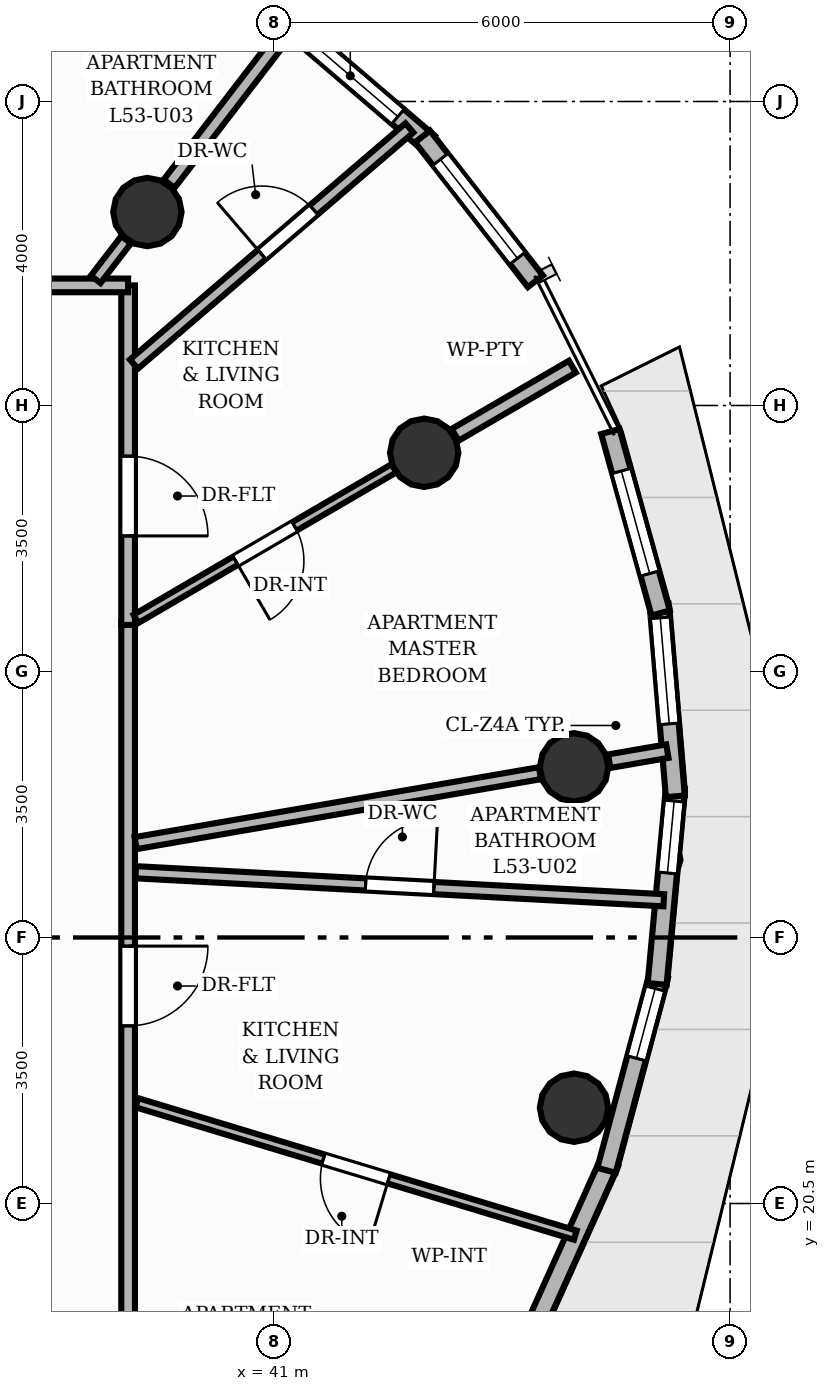
"""IFC4 building model, lengths in metres.
Left out: names, types, materials, properties, quantities, classifications, styles, units other than length and angle.
Written with IfcOpenShell. Run it as: python <this file> out.ifc"""

import sys

from ifc_helpers import new_model, si_unit, direction, frame, frame_2d, origin, origin_2d, place, context, subcontext, project, spatial, rectangle, circle, extrude, element, fill, save


model = new_model("IFC4")
c1 = context("Model", 3, precision=1e-05, world=origin(), true_north=direction((0.0, 1.0)))
c2 = subcontext(c1, "Body", "Model", "MODEL_VIEW")
j1 = project(units=[si_unit("LENGTHUNIT", "METRE"), si_unit("PLANEANGLEUNIT", "RADIAN")], contexts=[c1])
p1 = place(None, origin())
s1 = spatial("IfcSite", under=j1, at=p1, CompositionType="ELEMENT")
p2 = place(p1, origin())
s2 = spatial("IfcBuilding", under=s1, at=p2, CompositionType="ELEMENT")
p3 = place(p2, frame((0.0, 0.0, 179.04)))
s3 = spatial("IfcBuildingStorey", under=s2, at=p3, CompositionType="ELEMENT", Elevation=179.04)
for number, where, z_axis, x_axis in (
    (1, (44.946, 26.24, 0.0), (0.0, 0.0, 1.0), (1.0, 0.0, 0.0)),
    (2, (42.975, 30.378, 0.0), (0.0, 0.0, 1.0), (1.0, 0.0, 0.0)),
    (3, (39.333, 33.545, 0.0), (0.0, 0.0, 1.0), (1.0, 0.0, 0.0)),
    (4, (44.946, 21.76, 0.0), (0.0, 0.0, 1.0), (1.0, 0.0, 0.0)),
):
    element("IfcColumn", number, at=place(p3, frame(where, z_axis=z_axis, x_axis=x_axis)), inside=s3, PredefinedType="COLUMN", context=c2, shape_type="SweptSolid", body=[
        extrude(circle(Radius=0.45, at=origin_2d()), origin(), (0.0, 0.0, 1.0), 3.2),
    ])
p4 = place(p3, frame((41.198, 36.027, 0.0), z_axis=(0.0, 0.0, 1.0), x_axis=(0.759591927835, -0.65039995631, 0.0)))
e5 = element("IfcWall", 5, at=p4, inside=s3, PredefinedType="SOLIDWALL", context=c2, shape_type="SweptSolid", body=[
    extrude(rectangle(XDim=2.415, YDim=0.25, at=frame_2d((1.208, 0.0))), origin(), (0.0, 0.0, 1.0), 2.96),
])
p5 = place(p4, frame((0.234, 0.0, 0.85)))
e6 = element("IfcOpeningElement", 6, at=p5, cuts=e5, PredefinedType="OPENING", context=c2, shape_type="SweptSolid", body=[
    extrude(rectangle(XDim=1.65, YDim=1.52, at=frame_2d((0.825, 0.76))), frame((0.0, 0.135, 0.0), z_axis=(0.0, -1.0, 0.0), x_axis=(1.0, 0.0, 0.0)), (0.0, 0.0, 1.0), 0.27),
])
p6 = place(p3, frame((45.411, 21.04, 0.0), z_axis=(0.0, 0.0, 1.0), x_axis=(-0.410736648959, -0.911754026699, 0.0)))
e7 = element("IfcWall", 7, at=p6, inside=s3, PredefinedType="SOLIDWALL", context=c2, shape_type="SweptSolid", body=[
    extrude(rectangle(XDim=2.701, YDim=0.25, at=frame_2d((1.351, 0.0))), origin(), (0.0, 0.0, 1.0), 2.96),
])
p7 = place(p3, frame((46.06, 23.497, 0.0), z_axis=(0.0, 0.0, 1.0), x_axis=(-0.258688517816, -0.965960791518, 0.0)))
e8 = element("IfcWall", 8, at=p7, inside=s3, PredefinedType="SOLIDWALL", context=c2, shape_type="SweptSolid", body=[
    extrude(rectangle(XDim=2.651, YDim=0.25, at=frame_2d((1.326, 0.0))), origin(), (0.0, 0.0, 1.0), 2.96),
])
p8 = place(p7, frame((0.175, 0.0, 0.85)))
e9 = element("IfcOpeningElement", 9, at=p8, cuts=e8, PredefinedType="OPENING", context=c2, shape_type="SweptSolid", body=[
    extrude(rectangle(XDim=0.95, YDim=1.45, at=frame_2d((0.475, 0.725))), frame((0.0, 0.135, 0.0), z_axis=(0.0, -1.0, 0.0), x_axis=(1.0, 0.0, 0.0)), (0.0, 0.0, 1.0), 0.27),
])
p9 = place(p3, frame((46.28, 25.969, 0.0), z_axis=(0.0, 0.0, 1.0), x_axis=(-0.092582110032, -0.995705053167, 0.0)))
e10 = element("IfcWall", 10, at=p9, inside=s3, PredefinedType="SOLIDWALL", context=c2, shape_type="SweptSolid", body=[
    extrude(rectangle(XDim=2.592, YDim=0.25, at=frame_2d((1.296, 0.0))), origin(), (0.0, 0.0, 1.0), 2.96),
])
p10 = place(p9, frame((0.175, 0.0, 0.85)))
e11 = element("IfcOpeningElement", 11, at=p10, cuts=e10, PredefinedType="OPENING", context=c2, shape_type="SweptSolid", body=[
    extrude(rectangle(XDim=0.95, YDim=1.45, at=frame_2d((0.475, 0.725))), frame((0.0, 0.135, 0.0), z_axis=(0.0, -1.0, 0.0), x_axis=(1.0, 0.0, 0.0)), (0.0, 0.0, 1.0), 0.27),
])
p11 = place(p3, frame((46.066, 28.381, 0.0), z_axis=(0.0, 0.0, 1.0), x_axis=(0.084274320236, -0.996442591898, 0.0)))
e12 = element("IfcWall", 12, at=p11, inside=s3, PredefinedType="SOLIDWALL", context=c2, shape_type="SweptSolid", body=[
    extrude(rectangle(XDim=2.532, YDim=0.25, at=frame_2d((1.266, 0.0))), origin(), (0.0, 0.0, 1.0), 2.96),
])
p12 = place(p11, frame((0.175, 0.0, 0.85)))
e13 = element("IfcOpeningElement", 13, at=p12, cuts=e12, PredefinedType="OPENING", context=c2, shape_type="SweptSolid", body=[
    extrude(rectangle(XDim=1.4, YDim=1.55, at=frame_2d((0.7, 0.775))), frame((0.0, 0.135, 0.0), z_axis=(0.0, -1.0, 0.0), x_axis=(1.0, 0.0, 0.0)), (0.0, 0.0, 1.0), 0.27),
])
p13 = place(p3, frame((45.425, 30.658, 0.0), z_axis=(0.0, 0.0, 1.0), x_axis=(0.266734060973, -0.96377017007, 0.0)))
e14 = element("IfcWall", 14, at=p13, inside=s3, PredefinedType="SOLIDWALL", context=c2, shape_type="SweptSolid", body=[
    extrude(rectangle(XDim=2.478, YDim=0.25, at=frame_2d((1.239, 0.0))), origin(), (0.0, 0.0, 1.0), 2.96),
])
p14 = place(p13, frame((0.539, 0.0, 0.85)))
e15 = element("IfcOpeningElement", 15, at=p14, cuts=e14, PredefinedType="OPENING", context=c2, shape_type="SweptSolid", body=[
    extrude(rectangle(XDim=1.4, YDim=1.55, at=frame_2d((0.7, 0.775))), frame((0.0, 0.135, 0.0), z_axis=(0.0, -1.0, 0.0), x_axis=(1.0, 0.0, 0.0)), (0.0, 0.0, 1.0), 0.27),
])
p15 = place(p3, frame((42.953, 34.539, 0.0), z_axis=(0.0, 0.0, 1.0), x_axis=(0.61468225386, -0.788774826417, 0.0)))
e16 = element("IfcWall", 16, at=p15, inside=s3, PredefinedType="SOLIDWALL", context=c2, shape_type="SweptSolid", body=[
    extrude(rectangle(XDim=2.415, YDim=0.25, at=frame_2d((1.208, 0.0))), origin(), (0.0, 0.0, 1.0), 2.96),
])
p16 = place(p15, frame((0.382, 0.0, 0.85)))
e17 = element("IfcOpeningElement", 17, at=p16, cuts=e16, PredefinedType="OPENING", context=c2, shape_type="SweptSolid", body=[
    extrude(rectangle(XDim=1.65, YDim=1.55, at=frame_2d((0.825, 0.775))), frame((0.0, 0.135, 0.0), z_axis=(0.0, -1.0, 0.0), x_axis=(1.0, 0.0, 0.0)), (0.0, 0.0, 1.0), 0.27),
])
p17 = place(p3, frame((45.409, 26.32, 0.0), z_axis=(0.0, 0.0, 1.0), x_axis=(0.985363715758, 0.170465092225, 0.0)))
e18 = element("IfcWall", 18, at=p17, inside=s3, PredefinedType="PARTITIONING", context=c2, shape_type="SweptSolid", body=[
    extrude(rectangle(XDim=0.776, YDim=0.18, at=frame_2d((0.388, 0.0))), origin(), (0.0, 0.0, 1.0), 2.403),
])
p18 = place(p3, frame((43.382, 30.614, 0.0), z_axis=(0.0, 0.0, 1.0), x_axis=(0.86456661279, 0.502518230563, 0.0)))
e19 = element("IfcWall", 19, at=p18, inside=s3, PredefinedType="PARTITIONING", context=c2, shape_type="SweptSolid", body=[
    extrude(rectangle(XDim=1.785, YDim=0.18, at=frame_2d((0.893, 0.0))), origin(), (0.0, 0.0, 1.0), 2.403),
])
p19 = place(p3, frame((39.62, 33.918, 0.0), z_axis=(0.0, 0.0, 1.0), x_axis=(0.609164681512, 0.793043750873, 0.0)))
e20 = element("IfcWall", 20, at=p19, inside=s3, PredefinedType="PARTITIONING", context=c2, shape_type="SweptSolid", body=[
    extrude(rectangle(XDim=2.572, YDim=0.18, at=frame_2d((1.286, 0.0))), origin(), (0.0, 0.0, 1.0), 2.403),
])
p20 = place(p3, frame((39.08, 28.156, 0.0), z_axis=(0.0, 0.0, 1.0), x_axis=(0.0, -1.0, 0.0)))
e21 = element("IfcWall", 21, at=p20, inside=s3, PredefinedType="PARTITIONING", context=c2, shape_type="SweptSolid", body=[
    extrude(rectangle(XDim=12.736, YDim=0.18, at=frame_2d((6.368, 0.0))), origin(), (0.0, 0.0, 1.0), 2.955),
])
p21 = place(p20, frame((4.269, 0.0, 0.0)))
e22 = element("IfcOpeningElement", 22, at=p21, cuts=e21, PredefinedType="OPENING", context=c2, shape_type="SweptSolid", body=[
    extrude(rectangle(XDim=1.05, YDim=2.15, at=frame_2d((0.525, 1.075))), frame((0.0, 0.1, 0.0), z_axis=(0.0, -1.0, 0.0), x_axis=(1.0, 0.0, 0.0)), (0.0, 0.0, 1.0), 0.2),
])
p22 = place(p3, frame((39.08, 32.58, 0.0), z_axis=(0.0, 0.0, 1.0), x_axis=(0.0, -1.0, 0.0)))
e23 = element("IfcWall", 23, at=p22, inside=s3, PredefinedType="PARTITIONING", context=c2, shape_type="SweptSolid", body=[
    extrude(rectangle(XDim=4.468, YDim=0.18, at=frame_2d((2.234, 0.0))), origin(), (0.0, 0.0, 1.0), 2.955),
])
p23 = place(p22, frame((2.246, 0.0, 0.0)))
e24 = element("IfcOpeningElement", 24, at=p23, cuts=e23, PredefinedType="OPENING", context=c2, shape_type="SweptSolid", body=[
    extrude(rectangle(XDim=1.05, YDim=2.15, at=frame_2d((0.525, 1.075))), frame((0.0, 0.1, 0.0), z_axis=(0.0, -1.0, 0.0), x_axis=(1.0, 0.0, 0.0)), (0.0, 0.0, 1.0), 0.2),
])
p24 = place(p3, frame((33.2, 32.58, 0.0), z_axis=(0.0, 0.0, 1.0), x_axis=(1.0, 0.0, 0.0)))
e25 = element("IfcWall", 25, at=p24, inside=s3, PredefinedType="PARTITIONING", context=c2, shape_type="SweptSolid", body=[
    extrude(rectangle(XDim=5.88, YDim=0.18, at=frame_2d((2.94, 0.0))), origin(), (0.0, 0.0, 1.0), 2.955),
])
p25 = place(p24, frame((2.184, 0.0, 0.0)))
e26 = element("IfcOpeningElement", 26, at=p25, cuts=e25, PredefinedType="OPENING", context=c2, shape_type="SweptSolid", body=[
    extrude(rectangle(XDim=1.05, YDim=2.15, at=frame_2d((0.525, 1.075))), frame((0.0, 0.1, 0.0), z_axis=(0.0, -1.0, 0.0), x_axis=(1.0, 0.0, 0.0)), (0.0, 0.0, 1.0), 0.2),
])
p26 = place(p3, frame((39.18, 24.858, 0.0), z_axis=(0.0, 0.0, 1.0), x_axis=(0.998597105279, -0.05295112207, 0.0)))
e27 = element("IfcWall", 27, at=p26, inside=s3, PredefinedType="PLUMBINGWALL", context=c2, shape_type="SweptSolid", body=[
    extrude(rectangle(XDim=6.958, YDim=0.16, at=frame_2d((3.479, 0.0))), origin(), (0.0, 0.0, 1.0), 2.692),
])
p27 = place(p26, frame((3.029, 0.0, 0.0)))
e28 = element("IfcOpeningElement", 28, at=p27, cuts=e27, PredefinedType="OPENING", context=c2, shape_type="SweptSolid", body=[
    extrude(rectangle(XDim=0.9, YDim=2.1, at=frame_2d((0.45, 1.05))), frame((0.0, 0.09, 0.0), z_axis=(0.0, -1.0, 0.0), x_axis=(1.0, 0.0, 0.0)), (0.0, 0.0, 1.0), 0.18),
])
p28 = place(p3, frame((44.963, 20.083, 0.0), z_axis=(0.0, 0.0, 1.0), x_axis=(-0.95726021897, 0.289228064298, 0.0)))
e29 = element("IfcWall", 29, at=p28, inside=s3, PredefinedType="PARTITIONING", context=c2, shape_type="SweptSolid", body=[
    extrude(rectangle(XDim=6.026, YDim=0.125, at=frame_2d((3.013, 0.0))), origin(), (0.0, 0.0, 1.0), 2.692),
])
p29 = place(p28, frame((2.563, 0.0, 0.0)))
e30 = element("IfcOpeningElement", 30, at=p29, cuts=e29, PredefinedType="OPENING", context=c2, shape_type="SweptSolid", body=[
    extrude(rectangle(XDim=0.9, YDim=2.1, at=frame_2d((0.45, 1.05))), frame((0.0, 0.073, 0.0), z_axis=(0.0, -1.0, 0.0), x_axis=(1.0, 0.0, 0.0)), (0.0, 0.0, 1.0), 0.145),
])
p30 = place(p3, frame((39.178, 25.242, 0.0), z_axis=(0.0, 0.0, 1.0), x_axis=(0.985362047777, 0.170474733611, 0.0)))
e31 = element("IfcWall", 31, at=p30, inside=s3, PredefinedType="PLUMBINGWALL", context=c2, shape_type="SweptSolid", body=[
    extrude(rectangle(XDim=5.399, YDim=0.16, at=frame_2d((2.7, 0.0))), origin(), (0.0, 0.0, 1.0), 2.403),
])
p31 = place(p3, frame((39.156, 31.544, 0.0), z_axis=(0.0, 0.0, 1.0), x_axis=(0.759083333315, 0.650993466238, 0.0)))
e32 = element("IfcWall", 32, at=p31, inside=s3, PredefinedType="PLUMBINGWALL", context=c2, shape_type="SweptSolid", body=[
    extrude(rectangle(XDim=4.775, YDim=0.16, at=frame_2d((2.387, 0.0))), origin(), (0.0, 0.0, 1.0), 2.955),
])
p32 = place(p31, frame((2.217, 0.0, 0.0)))
e33 = element("IfcOpeningElement", 33, at=p32, cuts=e32, PredefinedType="OPENING", context=c2, shape_type="SweptSolid", body=[
    extrude(rectangle(XDim=0.9, YDim=2.1, at=frame_2d((0.45, 1.05))), frame((0.0, 0.09, 0.0), z_axis=(0.0, -1.0, 0.0), x_axis=(1.0, 0.0, 0.0)), (0.0, 0.0, 1.0), 0.18),
])
p33 = place(p3, frame((42.58, 30.175, 0.0), z_axis=(0.0, 0.0, 1.0), x_axis=(-0.863675291667, -0.504048599407, 0.0)))
e34 = element("IfcWall", 34, at=p33, inside=s3, PredefinedType="PARTITIONING", context=c2, shape_type="SweptSolid", body=[
    extrude(rectangle(XDim=3.932, YDim=0.125, at=frame_2d((1.966, 0.0))), origin(), (0.0, 0.0, 1.0), 2.403),
])
p34 = place(p33, frame((1.516, 0.0, 0.0)))
e35 = element("IfcOpeningElement", 35, at=p34, cuts=e34, PredefinedType="OPENING", context=c2, shape_type="SweptSolid", body=[
    extrude(rectangle(XDim=0.9, YDim=2.1, at=frame_2d((0.45, 1.05))), frame((0.0, 0.073, 0.0), z_axis=(0.0, -1.0, 0.0), x_axis=(1.0, 0.0, 0.0)), (0.0, 0.0, 1.0), 0.145),
])
p35 = place(p3, frame((38.653, 32.659, 0.0), z_axis=(0.0, 0.0, 1.0), x_axis=(0.609101063055, 0.79309261438, 0.0)))
e36 = element("IfcWall", 36, at=p35, inside=s3, PredefinedType="PLUMBINGWALL", context=c2, shape_type="SweptSolid", body=[
    extrude(rectangle(XDim=0.658, YDim=0.16, at=frame_2d((0.329, 0.0))), origin(), (0.0, 0.0, 1.0), 2.403),
])
p36 = place(p5, origin())
e37 = element("IfcWindow", 37, at=p36, inside=s3, PartitioningType="SINGLE_PANEL", PredefinedType="WINDOW", context=c2, shape_type="SweptSolid", body=[
    extrude(rectangle(XDim=1.65, YDim=1.52, at=frame_2d((0.825, 0.76))), frame((0.0, 0.03, 0.0), z_axis=(0.0, -1.0, 0.0), x_axis=(1.0, 0.0, 0.0)), (0.0, 0.0, 1.0), 0.06),
])
fill(e6, e37)
p37 = place(p8, origin())
e38 = element("IfcWindow", 38, at=p37, inside=s3, PartitioningType="SINGLE_PANEL", PredefinedType="WINDOW", context=c2, shape_type="SweptSolid", body=[
    extrude(rectangle(XDim=0.95, YDim=1.45, at=frame_2d((0.475, 0.725))), frame((0.0, 0.03, 0.0), z_axis=(0.0, -1.0, 0.0), x_axis=(1.0, 0.0, 0.0)), (0.0, 0.0, 1.0), 0.06),
])
fill(e9, e38)
p38 = place(p10, origin())
e39 = element("IfcWindow", 39, at=p38, inside=s3, PartitioningType="SINGLE_PANEL", PredefinedType="WINDOW", context=c2, shape_type="SweptSolid", body=[
    extrude(rectangle(XDim=0.95, YDim=1.45, at=frame_2d((0.475, 0.725))), frame((0.0, 0.03, 0.0), z_axis=(0.0, -1.0, 0.0), x_axis=(1.0, 0.0, 0.0)), (0.0, 0.0, 1.0), 0.06),
])
fill(e11, e39)
p39 = place(p12, origin())
e40 = element("IfcWindow", 40, at=p39, inside=s3, PartitioningType="SINGLE_PANEL", PredefinedType="WINDOW", context=c2, shape_type="SweptSolid", body=[
    extrude(rectangle(XDim=1.4, YDim=1.55, at=frame_2d((0.7, 0.775))), frame((0.0, 0.03, 0.0), z_axis=(0.0, -1.0, 0.0), x_axis=(1.0, 0.0, 0.0)), (0.0, 0.0, 1.0), 0.06),
])
fill(e13, e40)
p40 = place(p14, origin())
e41 = element("IfcWindow", 41, at=p40, inside=s3, PartitioningType="SINGLE_PANEL", PredefinedType="WINDOW", context=c2, shape_type="SweptSolid", body=[
    extrude(rectangle(XDim=1.4, YDim=1.55, at=frame_2d((0.7, 0.775))), frame((0.0, 0.03, 0.0), z_axis=(0.0, -1.0, 0.0), x_axis=(1.0, 0.0, 0.0)), (0.0, 0.0, 1.0), 0.06),
])
fill(e15, e41)
p41 = place(p16, origin())
e42 = element("IfcWindow", 42, at=p41, inside=s3, PartitioningType="SINGLE_PANEL", PredefinedType="WINDOW", context=c2, shape_type="SweptSolid", body=[
    extrude(rectangle(XDim=1.65, YDim=1.55, at=frame_2d((0.825, 0.775))), frame((0.0, 0.03, 0.0), z_axis=(0.0, -1.0, 0.0), x_axis=(1.0, 0.0, 0.0)), (0.0, 0.0, 1.0), 0.06),
])
fill(e17, e42)
p42 = place(p21, origin())
e43 = element("IfcDoor", 43, at=p42, inside=s3, OperationType="SINGLE_SWING_LEFT", PredefinedType="DOOR", context=c2, shape_type="SweptSolid", body=[
    extrude(rectangle(XDim=1.05, YDim=2.15, at=frame_2d((0.525, 1.075))), frame((0.0, 0.025, 0.0), z_axis=(0.0, -1.0, 0.0), x_axis=(1.0, 0.0, 0.0)), (0.0, 0.0, 1.0), 0.05),
])
fill(e22, e43)
p43 = place(p27, origin())
e44 = element("IfcDoor", 44, at=p43, inside=s3, OperationType="SINGLE_SWING_RIGHT", PredefinedType="DOOR", context=c2, shape_type="SweptSolid", body=[
    extrude(rectangle(XDim=0.9, YDim=2.1, at=frame_2d((0.45, 1.05))), frame((0.0, 0.025, 0.0), z_axis=(0.0, -1.0, 0.0), x_axis=(1.0, 0.0, 0.0)), (0.0, 0.0, 1.0), 0.05),
])
fill(e28, e44)
p44 = place(p29, origin())
e45 = element("IfcDoor", 45, at=p44, inside=s3, OperationType="SINGLE_SWING_LEFT", PredefinedType="DOOR", context=c2, shape_type="SweptSolid", body=[
    extrude(rectangle(XDim=0.9, YDim=2.1, at=frame_2d((0.45, 1.05))), frame((0.0, 0.025, 0.0), z_axis=(0.0, -1.0, 0.0), x_axis=(1.0, 0.0, 0.0)), (0.0, 0.0, 1.0), 0.05),
])
fill(e30, e45)
p45 = place(p23, origin())
e46 = element("IfcDoor", 46, at=p45, inside=s3, OperationType="SINGLE_SWING_RIGHT", PredefinedType="DOOR", context=c2, shape_type="SweptSolid", body=[
    extrude(rectangle(XDim=1.05, YDim=2.15, at=frame_2d((0.525, 1.075))), frame((0.0, 0.025, 0.0), z_axis=(0.0, -1.0, 0.0), x_axis=(1.0, 0.0, 0.0)), (0.0, 0.0, 1.0), 0.05),
])
fill(e24, e46)
p46 = place(p32, origin())
e47 = element("IfcDoor", 47, at=p46, inside=s3, OperationType="SINGLE_SWING_LEFT", PredefinedType="DOOR", context=c2, shape_type="SweptSolid", body=[
    extrude(rectangle(XDim=0.9, YDim=2.1, at=frame_2d((0.45, 1.05))), frame((0.0, 0.025, 0.0), z_axis=(0.0, -1.0, 0.0), x_axis=(1.0, 0.0, 0.0)), (0.0, 0.0, 1.0), 0.05),
])
fill(e33, e47)
p47 = place(p34, origin())
e48 = element("IfcDoor", 48, at=p47, inside=s3, OperationType="SINGLE_SWING_RIGHT", PredefinedType="DOOR", context=c2, shape_type="SweptSolid", body=[
    extrude(rectangle(XDim=0.9, YDim=2.1, at=frame_2d((0.45, 1.05))), frame((0.0, 0.025, 0.0), z_axis=(0.0, -1.0, 0.0), x_axis=(1.0, 0.0, 0.0)), (0.0, 0.0, 1.0), 0.05),
])
fill(e35, e48)
save(model, sys.argv[1])
